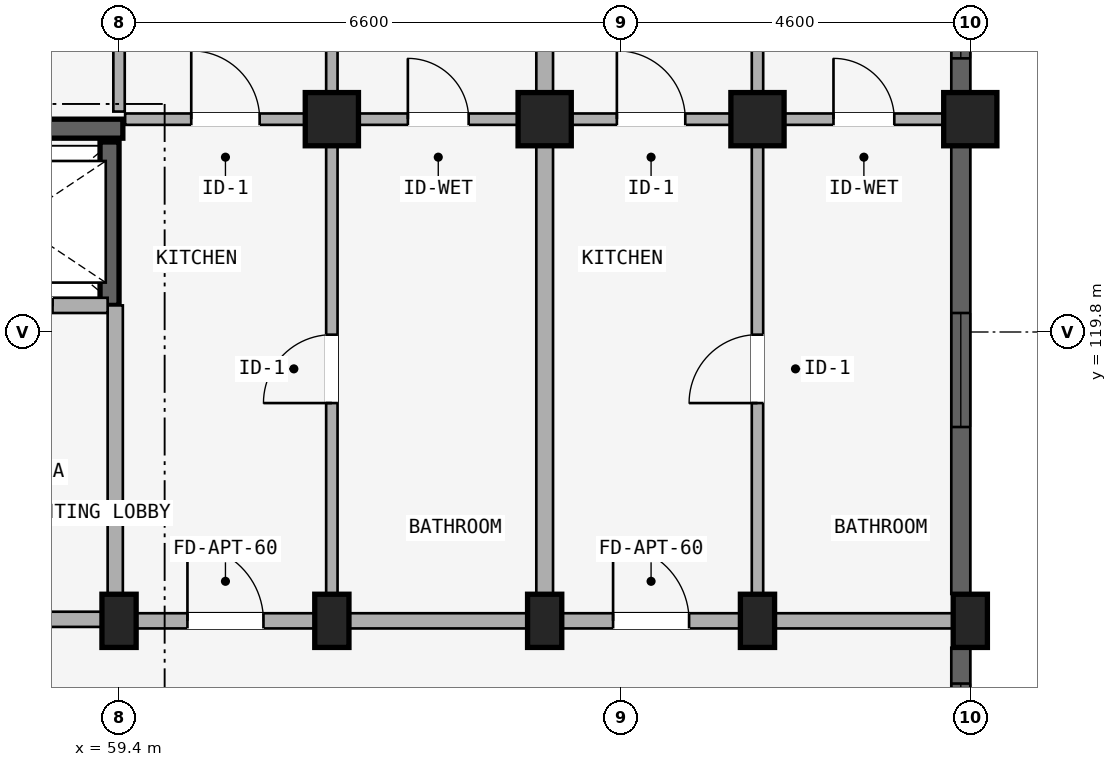
"""IFC4 building model, lengths in metres.
Left out: names, types, materials, properties, quantities, classifications, styles, units other than length and angle.
Written with IfcOpenShell. Run it as: python <this file> out.ifc"""

import sys

from ifc_helpers import new_model, si_unit, direction, frame, frame_2d, origin, origin_2d, place, context, subcontext, project, spatial, rectangle, extrude, element, fill, save


model = new_model("IFC4")
c1 = context("Model", 3, precision=1e-05, world=origin(), true_north=direction((0.0, 1.0)))
c2 = subcontext(c1, "Body", "Model", "MODEL_VIEW")
j1 = project(units=[si_unit("LENGTHUNIT", "METRE"), si_unit("PLANEANGLEUNIT", "RADIAN")], contexts=[c1])
p1 = place(None, origin())
s1 = spatial("IfcSite", under=j1, at=p1, CompositionType="ELEMENT")
p2 = place(p1, origin())
s2 = spatial("IfcBuilding", under=s1, at=p2, CompositionType="ELEMENT")
p3 = place(p2, frame((0.0, 0.0, 18.15)))
s3 = spatial("IfcBuildingStorey", under=s2, at=p3, CompositionType="ELEMENT", Elevation=18.15)
p4 = place(p3, frame((56.65, 122.475, 0.0), z_axis=(0.0, 0.0, 1.0), x_axis=(1.0, 0.0, 0.0)))
e1 = element("IfcWall", 1, at=p4, inside=s3, PredefinedType="SHEAR", context=c2, shape_type="SweptSolid", body=[
    extrude(rectangle(XDim=2.8, YDim=0.25, at=frame_2d((1.4, 0.0))), origin(), (0.0, 0.0, 1.0), 2.93),
])
p5 = place(p3, frame((59.275, 120.15, 0.0), z_axis=(0.0, 0.0, 1.0), x_axis=(0.0, 1.0, 0.0)))
e2 = element("IfcWall", 2, at=p5, inside=s3, PredefinedType="SHEAR", context=c2, shape_type="SweptSolid", body=[
    extrude(rectangle(XDim=2.15, YDim=0.25, at=frame_2d((1.075, 0.0))), origin(), (0.0, 0.0, 1.0), 2.93),
])
for number, where, z_axis, x_axis in (
    (3, (59.4, 116.0, 0.0), (0.0, 0.0, 1.0), (1.0, 0.0, 0.0)),
    (4, (62.2, 116.0, 0.0), (0.0, 0.0, 1.0), (1.0, 0.0, 0.0)),
):
    element("IfcColumn", number, at=place(p3, frame(where, z_axis=z_axis, x_axis=x_axis)), inside=s3, PredefinedType="COLUMN", context=c2, shape_type="SweptSolid", body=[
        extrude(rectangle(XDim=0.45, YDim=0.7, at=origin_2d()), origin(), (0.0, 0.0, 1.0), 2.93),
    ])
p6 = place(p3, frame((62.2, 122.6, 0.0), z_axis=(0.0, 0.0, 1.0), x_axis=(1.0, 0.0, 0.0)))
e5 = element("IfcColumn", 5, at=p6, inside=s3, PredefinedType="COLUMN", context=c2, shape_type="SweptSolid", body=[
    extrude(rectangle(XDim=0.7, YDim=0.7, at=origin_2d()), origin(), (0.0, 0.0, 1.0), 2.93),
])
p7 = place(p3, frame((65.0, 116.0, 0.0), z_axis=(0.0, 0.0, 1.0), x_axis=(1.0, 0.0, 0.0)))
e6 = element("IfcColumn", 6, at=p7, inside=s3, PredefinedType="COLUMN", context=c2, shape_type="SweptSolid", body=[
    extrude(rectangle(XDim=0.45, YDim=0.7, at=origin_2d()), origin(), (0.0, 0.0, 1.0), 2.93),
])
p8 = place(p3, frame((65.0, 122.6, 0.0), z_axis=(0.0, 0.0, 1.0), x_axis=(1.0, 0.0, 0.0)))
e7 = element("IfcColumn", 7, at=p8, inside=s3, PredefinedType="COLUMN", context=c2, shape_type="SweptSolid", body=[
    extrude(rectangle(XDim=0.7, YDim=0.7, at=origin_2d()), origin(), (0.0, 0.0, 1.0), 2.93),
])
p9 = place(p3, frame((67.8, 116.0, 0.0), z_axis=(0.0, 0.0, 1.0), x_axis=(1.0, 0.0, 0.0)))
e8 = element("IfcColumn", 8, at=p9, inside=s3, PredefinedType="COLUMN", context=c2, shape_type="SweptSolid", body=[
    extrude(rectangle(XDim=0.45, YDim=0.7, at=origin_2d()), origin(), (0.0, 0.0, 1.0), 2.93),
])
p10 = place(p3, frame((67.8, 122.6, 0.0), z_axis=(0.0, 0.0, 1.0), x_axis=(1.0, 0.0, 0.0)))
e9 = element("IfcColumn", 9, at=p10, inside=s3, PredefinedType="COLUMN", context=c2, shape_type="SweptSolid", body=[
    extrude(rectangle(XDim=0.7, YDim=0.7, at=origin_2d()), origin(), (0.0, 0.0, 1.0), 2.93),
])
p11 = place(p3, frame((70.6, 116.0, 0.0), z_axis=(0.0, 0.0, 1.0), x_axis=(1.0, 0.0, 0.0)))
e10 = element("IfcColumn", 10, at=p11, inside=s3, PredefinedType="COLUMN", context=c2, shape_type="SweptSolid", body=[
    extrude(rectangle(XDim=0.45, YDim=0.7, at=origin_2d()), origin(), (0.0, 0.0, 1.0), 2.93),
])
p12 = place(p3, frame((70.6, 122.6, 0.0), z_axis=(0.0, 0.0, 1.0), x_axis=(1.0, 0.0, 0.0)))
e11 = element("IfcColumn", 11, at=p12, inside=s3, PredefinedType="COLUMN", context=c2, shape_type="SweptSolid", body=[
    extrude(rectangle(XDim=0.7, YDim=0.7, at=origin_2d()), origin(), (0.0, 0.0, 1.0), 2.93),
])
p13 = place(p3, frame((53.7, 116.02, 0.0), z_axis=(0.0, 0.0, 1.0), x_axis=(1.0, 0.0, 0.0)))
e12 = element("IfcWall", 12, at=p13, inside=s3, PredefinedType="STANDARD", context=c2, shape_type="SweptSolid", body=[
    extrude(rectangle(XDim=5.65, YDim=0.2, at=frame_2d((2.825, 0.0))), origin(), (0.0, 0.0, 1.0), 2.372),
])
p14 = place(p13, frame((1.923, 0.0, 0.0)))
e13 = element("IfcOpeningElement", 13, at=p14, cuts=e12, PredefinedType="OPENING", context=c2, shape_type="SweptSolid", body=[
    extrude(rectangle(XDim=1.24, YDim=2.15, at=frame_2d((0.62, 1.075))), frame((0.0, 0.11, 0.0), z_axis=(0.0, -1.0, 0.0), x_axis=(1.0, 0.0, 0.0)), (0.0, 0.0, 1.0), 0.22),
])
p15 = place(p3, frame((59.35, 116.02, 0.0), z_axis=(0.0, 0.0, 1.0), x_axis=(0.0, 1.0, 0.0)))
e14 = element("IfcWall", 14, at=p15, inside=s3, PredefinedType="STANDARD", context=c2, shape_type="SweptSolid", body=[
    extrude(rectangle(XDim=4.13, YDim=0.2, at=frame_2d((2.065, 0.0))), origin(), (0.0, 0.0, 1.0), 2.372),
])
p16 = place(p3, frame((56.7, 120.15, 0.0), z_axis=(0.0, 0.0, 1.0), x_axis=(1.0, 0.0, 0.0)))
e15 = element("IfcWall", 15, at=p16, inside=s3, PredefinedType="STANDARD", context=c2, shape_type="SweptSolid", body=[
    extrude(rectangle(XDim=2.55, YDim=0.2, at=frame_2d((1.275, 0.0))), origin(), (0.0, 0.0, 1.0), 2.372),
])
p17 = place(p16, frame((0.725, 0.0, 0.0)))
e16 = element("IfcOpeningElement", 16, at=p17, cuts=e15, PredefinedType="OPENING", context=c2, shape_type="SweptSolid", body=[
    extrude(rectangle(XDim=1.1, YDim=2.15, at=frame_2d((0.55, 1.075))), frame((0.0, 0.11, 0.0), z_axis=(0.0, -1.0, 0.0), x_axis=(1.0, 0.0, 0.0)), (0.0, 0.0, 1.0), 0.22),
])
p18 = place(p3, frame((59.4, 116.0, 0.0), z_axis=(0.0, 0.0, 1.0), x_axis=(1.0, 0.0, 0.0)))
e17 = element("IfcWall", 17, at=p18, inside=s3, PredefinedType="STANDARD", context=c2, shape_type="SweptSolid", body=[
    extrude(rectangle(XDim=2.8, YDim=0.2, at=frame_2d((1.4, 0.0))), origin(), (0.0, 0.0, 1.0), 2.372),
])
p19 = place(p18, frame((0.9, 0.0, 0.0)))
e18 = element("IfcOpeningElement", 18, at=p19, cuts=e17, PredefinedType="OPENING", context=c2, shape_type="SweptSolid", body=[
    extrude(rectangle(XDim=1.0, YDim=2.15, at=frame_2d((0.5, 1.075))), frame((0.0, 0.11, 0.0), z_axis=(0.0, -1.0, 0.0), x_axis=(1.0, 0.0, 0.0)), (0.0, 0.0, 1.0), 0.22),
])
p20 = place(p3, frame((59.48, 122.6, 0.0), z_axis=(0.0, 0.0, 1.0), x_axis=(1.0, 0.0, 0.0)))
e19 = element("IfcWall", 19, at=p20, inside=s3, PredefinedType="PLUMBINGWALL", context=c2, shape_type="SweptSolid", body=[
    extrude(rectangle(XDim=2.64, YDim=0.15, at=frame_2d((1.32, 0.0))), origin(), (0.0, 0.0, 1.0), 2.372),
])
p21 = place(p20, frame((0.87, 0.0, 0.0)))
e20 = element("IfcOpeningElement", 20, at=p21, cuts=e19, PredefinedType="OPENING", context=c2, shape_type="SweptSolid", body=[
    extrude(rectangle(XDim=0.9, YDim=2.1, at=frame_2d((0.45, 1.05))), frame((0.0, 0.085, 0.0), z_axis=(0.0, -1.0, 0.0), x_axis=(1.0, 0.0, 0.0)), (0.0, 0.0, 1.0), 0.17),
])
p22 = place(p3, frame((62.2, 116.0, 0.0), z_axis=(0.0, 0.0, 1.0), x_axis=(1.0, 0.0, 0.0)))
e21 = element("IfcWall", 21, at=p22, inside=s3, PredefinedType="STANDARD", context=c2, shape_type="SweptSolid", body=[
    extrude(rectangle(XDim=2.8, YDim=0.2, at=frame_2d((1.4, 0.0))), origin(), (0.0, 0.0, 1.0), 2.372),
])
p23 = place(p3, frame((62.28, 122.6, 0.0), z_axis=(0.0, 0.0, 1.0), x_axis=(1.0, 0.0, 0.0)))
e22 = element("IfcWall", 22, at=p23, inside=s3, PredefinedType="PLUMBINGWALL", context=c2, shape_type="SweptSolid", body=[
    extrude(rectangle(XDim=2.64, YDim=0.15, at=frame_2d((1.32, 0.0))), origin(), (0.0, 0.0, 1.0), 2.372),
])
p24 = place(p23, frame((0.92, 0.0, 0.0)))
e23 = element("IfcOpeningElement", 23, at=p24, cuts=e22, PredefinedType="OPENING", context=c2, shape_type="SweptSolid", body=[
    extrude(rectangle(XDim=0.8, YDim=2.1, at=frame_2d((0.4, 1.05))), frame((0.0, 0.085, 0.0), z_axis=(0.0, -1.0, 0.0), x_axis=(1.0, 0.0, 0.0)), (0.0, 0.0, 1.0), 0.17),
])
p25 = place(p3, frame((65.0, 116.0, 0.0), z_axis=(0.0, 0.0, 1.0), x_axis=(1.0, 0.0, 0.0)))
e24 = element("IfcWall", 24, at=p25, inside=s3, PredefinedType="STANDARD", context=c2, shape_type="SweptSolid", body=[
    extrude(rectangle(XDim=2.8, YDim=0.2, at=frame_2d((1.4, 0.0))), origin(), (0.0, 0.0, 1.0), 2.372),
])
p26 = place(p25, frame((0.9, 0.0, 0.0)))
e25 = element("IfcOpeningElement", 25, at=p26, cuts=e24, PredefinedType="OPENING", context=c2, shape_type="SweptSolid", body=[
    extrude(rectangle(XDim=1.0, YDim=2.15, at=frame_2d((0.5, 1.075))), frame((0.0, 0.11, 0.0), z_axis=(0.0, -1.0, 0.0), x_axis=(1.0, 0.0, 0.0)), (0.0, 0.0, 1.0), 0.22),
])
p27 = place(p3, frame((65.08, 122.6, 0.0), z_axis=(0.0, 0.0, 1.0), x_axis=(1.0, 0.0, 0.0)))
e26 = element("IfcWall", 26, at=p27, inside=s3, PredefinedType="PLUMBINGWALL", context=c2, shape_type="SweptSolid", body=[
    extrude(rectangle(XDim=2.64, YDim=0.15, at=frame_2d((1.32, 0.0))), origin(), (0.0, 0.0, 1.0), 2.372),
])
p28 = place(p27, frame((0.87, 0.0, 0.0)))
e27 = element("IfcOpeningElement", 27, at=p28, cuts=e26, PredefinedType="OPENING", context=c2, shape_type="SweptSolid", body=[
    extrude(rectangle(XDim=0.9, YDim=2.1, at=frame_2d((0.45, 1.05))), frame((0.0, 0.085, 0.0), z_axis=(0.0, -1.0, 0.0), x_axis=(1.0, 0.0, 0.0)), (0.0, 0.0, 1.0), 0.17),
])
p29 = place(p3, frame((67.8, 116.0, 0.0), z_axis=(0.0, 0.0, 1.0), x_axis=(1.0, 0.0, 0.0)))
e28 = element("IfcWall", 28, at=p29, inside=s3, PredefinedType="STANDARD", context=c2, shape_type="SweptSolid", body=[
    extrude(rectangle(XDim=2.8, YDim=0.2, at=frame_2d((1.4, 0.0))), origin(), (0.0, 0.0, 1.0), 2.372),
])
p30 = place(p3, frame((67.88, 122.6, 0.0), z_axis=(0.0, 0.0, 1.0), x_axis=(1.0, 0.0, 0.0)))
e29 = element("IfcWall", 29, at=p30, inside=s3, PredefinedType="PLUMBINGWALL", context=c2, shape_type="SweptSolid", body=[
    extrude(rectangle(XDim=2.64, YDim=0.15, at=frame_2d((1.32, 0.0))), origin(), (0.0, 0.0, 1.0), 2.372),
])
p31 = place(p30, frame((0.92, 0.0, 0.0)))
e30 = element("IfcOpeningElement", 30, at=p31, cuts=e29, PredefinedType="OPENING", context=c2, shape_type="SweptSolid", body=[
    extrude(rectangle(XDim=0.8, YDim=2.1, at=frame_2d((0.4, 1.05))), frame((0.0, 0.085, 0.0), z_axis=(0.0, -1.0, 0.0), x_axis=(1.0, 0.0, 0.0)), (0.0, 0.0, 1.0), 0.17),
])
p32 = place(p3, frame((59.4, 122.7, 0.0), z_axis=(0.0, 0.0, 1.0), x_axis=(0.0, 1.0, 0.0)))
e31 = element("IfcWall", 31, at=p32, inside=s3, PredefinedType="PARTITIONING", context=c2, shape_type="SweptSolid", body=[
    extrude(rectangle(XDim=10.82, YDim=0.15, at=frame_2d((5.41, 0.0))), origin(), (0.0, 0.0, 1.0), 2.372),
])
p33 = place(p32, frame((0.899, 0.0, 0.0)))
e32 = element("IfcOpeningElement", 32, at=p33, cuts=e31, PredefinedType="OPENING", context=c2, shape_type="SweptSolid", body=[
    extrude(rectangle(XDim=0.8, YDim=2.1, at=frame_2d((0.4, 1.05))), frame((0.0, 0.085, 0.0), z_axis=(0.0, -1.0, 0.0), x_axis=(1.0, 0.0, 0.0)), (0.0, 0.0, 1.0), 0.17),
])
p34 = place(p3, frame((62.2, 116.05, 0.0), z_axis=(0.0, 0.0, 1.0), x_axis=(0.0, 1.0, 0.0)))
e33 = element("IfcWall", 33, at=p34, inside=s3, PredefinedType="PARTITIONING", context=c2, shape_type="SweptSolid", body=[
    extrude(rectangle(XDim=6.53, YDim=0.15, at=frame_2d((3.265, 0.0))), origin(), (0.0, 0.0, 1.0), 2.372),
])
p35 = place(p34, frame((2.815, 0.0, 0.0)))
e34 = element("IfcOpeningElement", 34, at=p35, cuts=e33, PredefinedType="OPENING", context=c2, shape_type="SweptSolid", body=[
    extrude(rectangle(XDim=0.9, YDim=2.1, at=frame_2d((0.45, 1.05))), frame((0.0, 0.085, 0.0), z_axis=(0.0, -1.0, 0.0), x_axis=(1.0, 0.0, 0.0)), (0.0, 0.0, 1.0), 0.17),
])
p36 = place(p3, frame((62.2, 122.7, 0.0), z_axis=(0.0, 0.0, 1.0), x_axis=(0.0, 1.0, 0.0)))
e35 = element("IfcWall", 35, at=p36, inside=s3, PredefinedType="PARTITIONING", context=c2, shape_type="SweptSolid", body=[
    extrude(rectangle(XDim=10.82, YDim=0.15, at=frame_2d((5.41, 0.0))), origin(), (0.0, 0.0, 1.0), 2.372),
])
p37 = place(p36, frame((0.899, 0.0, 0.0)))
e36 = element("IfcOpeningElement", 36, at=p37, cuts=e35, PredefinedType="OPENING", context=c2, shape_type="SweptSolid", body=[
    extrude(rectangle(XDim=0.8, YDim=2.1, at=frame_2d((0.4, 1.05))), frame((0.0, 0.085, 0.0), z_axis=(0.0, -1.0, 0.0), x_axis=(1.0, 0.0, 0.0)), (0.0, 0.0, 1.0), 0.17),
])
p38 = place(p3, frame((65.0, 116.05, 0.0), z_axis=(0.0, 0.0, 1.0), x_axis=(0.0, 1.0, 0.0)))
e37 = element("IfcWall", 37, at=p38, inside=s3, PredefinedType="STANDARD", context=c2, shape_type="SweptSolid", body=[
    extrude(rectangle(XDim=6.53, YDim=0.22, at=frame_2d((3.265, 0.0))), origin(), (0.0, 0.0, 1.0), 2.372),
])
p39 = place(p3, frame((65.0, 122.7, 0.0), z_axis=(0.0, 0.0, 1.0), x_axis=(0.0, 1.0, 0.0)))
e38 = element("IfcWall", 38, at=p39, inside=s3, PredefinedType="STANDARD", context=c2, shape_type="SweptSolid", body=[
    extrude(rectangle(XDim=10.82, YDim=0.22, at=frame_2d((5.41, 0.0))), origin(), (0.0, 0.0, 1.0), 2.372),
])
p40 = place(p3, frame((67.8, 116.05, 0.0), z_axis=(0.0, 0.0, 1.0), x_axis=(0.0, 1.0, 0.0)))
e39 = element("IfcWall", 39, at=p40, inside=s3, PredefinedType="PARTITIONING", context=c2, shape_type="SweptSolid", body=[
    extrude(rectangle(XDim=6.53, YDim=0.15, at=frame_2d((3.265, 0.0))), origin(), (0.0, 0.0, 1.0), 2.372),
])
p41 = place(p40, frame((2.815, 0.0, 0.0)))
e40 = element("IfcOpeningElement", 40, at=p41, cuts=e39, PredefinedType="OPENING", context=c2, shape_type="SweptSolid", body=[
    extrude(rectangle(XDim=0.9, YDim=2.1, at=frame_2d((0.45, 1.05))), frame((0.0, 0.085, 0.0), z_axis=(0.0, -1.0, 0.0), x_axis=(1.0, 0.0, 0.0)), (0.0, 0.0, 1.0), 0.17),
])
p42 = place(p3, frame((67.8, 122.7, 0.0), z_axis=(0.0, 0.0, 1.0), x_axis=(0.0, 1.0, 0.0)))
e41 = element("IfcWall", 41, at=p42, inside=s3, PredefinedType="PARTITIONING", context=c2, shape_type="SweptSolid", body=[
    extrude(rectangle(XDim=10.82, YDim=0.15, at=frame_2d((5.41, 0.0))), origin(), (0.0, 0.0, 1.0), 2.372),
])
p43 = place(p42, frame((0.899, 0.0, 0.0)))
e42 = element("IfcOpeningElement", 42, at=p43, cuts=e41, PredefinedType="OPENING", context=c2, shape_type="SweptSolid", body=[
    extrude(rectangle(XDim=0.8, YDim=2.1, at=frame_2d((0.4, 1.05))), frame((0.0, 0.085, 0.0), z_axis=(0.0, -1.0, 0.0), x_axis=(1.0, 0.0, 0.0)), (0.0, 0.0, 1.0), 0.17),
])
p44 = place(p3, frame((70.475, 113.954, 0.0), z_axis=(0.0, 0.0, 1.0), x_axis=(0.0, 1.0, 0.0)))
e43 = element("IfcWall", 43, at=p44, inside=s3, PredefinedType="STANDARD", context=c2, shape_type="SweptSolid", body=[
    extrude(rectangle(XDim=1.693, YDim=0.25, at=frame_2d((0.846, 0.0))), origin(), (0.0, 0.0, 1.0), 2.372),
])
p45 = place(p44, frame((0.471, 0.0, 0.88)))
e44 = element("IfcOpeningElement", 44, at=p45, cuts=e43, PredefinedType="OPENING", context=c2, shape_type="SweptSolid", body=[
    extrude(rectangle(XDim=0.75, YDim=1.05, at=frame_2d((0.375, 0.525))), frame((0.0, 0.135, 0.0), z_axis=(0.0, -1.0, 0.0), x_axis=(1.0, 0.0, 0.0)), (0.0, 0.0, 1.0), 0.27),
])
p46 = place(p3, frame((70.475, 116.354, 0.0), z_axis=(0.0, 0.0, 1.0), x_axis=(0.0, 1.0, 0.0)))
e45 = element("IfcWall", 45, at=p46, inside=s3, PredefinedType="STANDARD", context=c2, shape_type="SweptSolid", body=[
    extrude(rectangle(XDim=5.893, YDim=0.25, at=frame_2d((2.947, 0.0))), origin(), (0.0, 0.0, 1.0), 2.372),
])
p47 = place(p46, frame((2.197, 0.0, 0.522)))
e46 = element("IfcOpeningElement", 46, at=p47, cuts=e45, PredefinedType="OPENING", context=c2, shape_type="SweptSolid", body=[
    extrude(rectangle(XDim=1.5, YDim=1.65, at=frame_2d((0.75, 0.825))), frame((0.0, 0.135, 0.0), z_axis=(0.0, -1.0, 0.0), x_axis=(1.0, 0.0, 0.0)), (0.0, 0.0, 1.0), 0.27),
])
p48 = place(p3, frame((70.475, 122.954, 0.0), z_axis=(0.0, 0.0, 1.0), x_axis=(0.0, 1.0, 0.0)))
e47 = element("IfcWall", 47, at=p48, inside=s3, PredefinedType="STANDARD", context=c2, shape_type="SweptSolid", body=[
    extrude(rectangle(XDim=2.093, YDim=0.25, at=frame_2d((1.046, 0.0))), origin(), (0.0, 0.0, 1.0), 2.372),
])
p49 = place(p48, frame((0.447, 0.0, 0.672)))
e48 = element("IfcOpeningElement", 48, at=p49, cuts=e47, PredefinedType="OPENING", context=c2, shape_type="SweptSolid", body=[
    extrude(rectangle(XDim=1.2, YDim=1.5, at=frame_2d((0.6, 0.75))), frame((0.0, 0.135, 0.0), z_axis=(0.0, -1.0, 0.0), x_axis=(1.0, 0.0, 0.0)), (0.0, 0.0, 1.0), 0.27),
])
p50 = place(p45, origin())
e49 = element("IfcWindow", 49, at=p50, inside=s3, PartitioningType="SINGLE_PANEL", PredefinedType="WINDOW", context=c2, shape_type="SweptSolid", body=[
    extrude(rectangle(XDim=0.75, YDim=1.05, at=frame_2d((0.375, 0.525))), frame((0.0, 0.03, 0.0), z_axis=(0.0, -1.0, 0.0), x_axis=(1.0, 0.0, 0.0)), (0.0, 0.0, 1.0), 0.06),
])
fill(e44, e49)
p51 = place(p47, origin())
e50 = element("IfcWindow", 50, at=p51, inside=s3, PartitioningType="DOUBLE_PANEL_VERTICAL", PredefinedType="WINDOW", context=c2, shape_type="SweptSolid", body=[
    extrude(rectangle(XDim=1.5, YDim=1.65, at=frame_2d((0.75, 0.825))), frame((0.0, 0.03, 0.0), z_axis=(0.0, -1.0, 0.0), x_axis=(1.0, 0.0, 0.0)), (0.0, 0.0, 1.0), 0.06),
])
fill(e46, e50)
p52 = place(p49, origin())
e51 = element("IfcWindow", 51, at=p52, inside=s3, PartitioningType="SINGLE_PANEL", PredefinedType="WINDOW", context=c2, shape_type="SweptSolid", body=[
    extrude(rectangle(XDim=1.2, YDim=1.5, at=frame_2d((0.6, 0.75))), frame((0.0, 0.03, 0.0), z_axis=(0.0, -1.0, 0.0), x_axis=(1.0, 0.0, 0.0)), (0.0, 0.0, 1.0), 0.06),
])
fill(e48, e51)
p53 = place(p17, origin())
e52 = element("IfcDoor", 52, at=p53, inside=s3, OperationType="SLIDING_TO_LEFT", PredefinedType="DOOR", context=c2, shape_type="SweptSolid", body=[
    extrude(rectangle(XDim=1.1, YDim=2.15, at=frame_2d((0.55, 1.075))), frame((0.0, 0.025, 0.0), z_axis=(0.0, -1.0, 0.0), x_axis=(1.0, 0.0, 0.0)), (0.0, 0.0, 1.0), 0.05),
])
fill(e16, e52)
p54 = place(p21, origin())
e53 = element("IfcDoor", 53, at=p54, inside=s3, OperationType="SINGLE_SWING_LEFT", PredefinedType="DOOR", context=c2, shape_type="SweptSolid", body=[
    extrude(rectangle(XDim=0.9, YDim=2.1, at=frame_2d((0.45, 1.05))), frame((0.0, 0.025, 0.0), z_axis=(0.0, -1.0, 0.0), x_axis=(1.0, 0.0, 0.0)), (0.0, 0.0, 1.0), 0.05),
])
fill(e20, e53)
p55 = place(p19, frame((1.0, 0.0, 0.0), z_axis=(0.0, 0.0, 1.0), x_axis=(-1.0, 0.0, 0.0)))
e54 = element("IfcDoor", 54, at=p55, inside=s3, OperationType="SINGLE_SWING_RIGHT", PredefinedType="DOOR", context=c2, shape_type="SweptSolid", body=[
    extrude(rectangle(XDim=1.0, YDim=2.15, at=frame_2d((0.5, 1.075))), frame((0.0, 0.025, 0.0), z_axis=(0.0, -1.0, 0.0), x_axis=(1.0, 0.0, 0.0)), (0.0, 0.0, 1.0), 0.05),
])
fill(e18, e54)
p56 = place(p24, origin())
e55 = element("IfcDoor", 55, at=p56, inside=s3, OperationType="SINGLE_SWING_LEFT", PredefinedType="DOOR", context=c2, shape_type="SweptSolid", body=[
    extrude(rectangle(XDim=0.8, YDim=2.1, at=frame_2d((0.4, 1.05))), frame((0.0, 0.025, 0.0), z_axis=(0.0, -1.0, 0.0), x_axis=(1.0, 0.0, 0.0)), (0.0, 0.0, 1.0), 0.05),
])
fill(e23, e55)
p57 = place(p28, origin())
e56 = element("IfcDoor", 56, at=p57, inside=s3, OperationType="SINGLE_SWING_LEFT", PredefinedType="DOOR", context=c2, shape_type="SweptSolid", body=[
    extrude(rectangle(XDim=0.9, YDim=2.1, at=frame_2d((0.45, 1.05))), frame((0.0, 0.025, 0.0), z_axis=(0.0, -1.0, 0.0), x_axis=(1.0, 0.0, 0.0)), (0.0, 0.0, 1.0), 0.05),
])
fill(e27, e56)
p58 = place(p26, frame((1.0, 0.0, 0.0), z_axis=(0.0, 0.0, 1.0), x_axis=(-1.0, 0.0, 0.0)))
e57 = element("IfcDoor", 57, at=p58, inside=s3, OperationType="SINGLE_SWING_RIGHT", PredefinedType="DOOR", context=c2, shape_type="SweptSolid", body=[
    extrude(rectangle(XDim=1.0, YDim=2.15, at=frame_2d((0.5, 1.075))), frame((0.0, 0.025, 0.0), z_axis=(0.0, -1.0, 0.0), x_axis=(1.0, 0.0, 0.0)), (0.0, 0.0, 1.0), 0.05),
])
fill(e25, e57)
p59 = place(p31, origin())
e58 = element("IfcDoor", 58, at=p59, inside=s3, OperationType="SINGLE_SWING_LEFT", PredefinedType="DOOR", context=c2, shape_type="SweptSolid", body=[
    extrude(rectangle(XDim=0.8, YDim=2.1, at=frame_2d((0.4, 1.05))), frame((0.0, 0.025, 0.0), z_axis=(0.0, -1.0, 0.0), x_axis=(1.0, 0.0, 0.0)), (0.0, 0.0, 1.0), 0.05),
])
fill(e30, e58)
p60 = place(p35, frame((0.9, 0.0, 0.0), z_axis=(0.0, 0.0, 1.0), x_axis=(-1.0, 0.0, 0.0)))
e59 = element("IfcDoor", 59, at=p60, inside=s3, OperationType="SINGLE_SWING_RIGHT", PredefinedType="DOOR", context=c2, shape_type="SweptSolid", body=[
    extrude(rectangle(XDim=0.9, YDim=2.1, at=frame_2d((0.45, 1.05))), frame((0.0, 0.025, 0.0), z_axis=(0.0, -1.0, 0.0), x_axis=(1.0, 0.0, 0.0)), (0.0, 0.0, 1.0), 0.05),
])
fill(e34, e59)
p61 = place(p41, origin())
e60 = element("IfcDoor", 60, at=p61, inside=s3, OperationType="SINGLE_SWING_LEFT", PredefinedType="DOOR", context=c2, shape_type="SweptSolid", body=[
    extrude(rectangle(XDim=0.9, YDim=2.1, at=frame_2d((0.45, 1.05))), frame((0.0, 0.025, 0.0), z_axis=(0.0, -1.0, 0.0), x_axis=(1.0, 0.0, 0.0)), (0.0, 0.0, 1.0), 0.05),
])
fill(e40, e60)
save(model, sys.argv[1])
